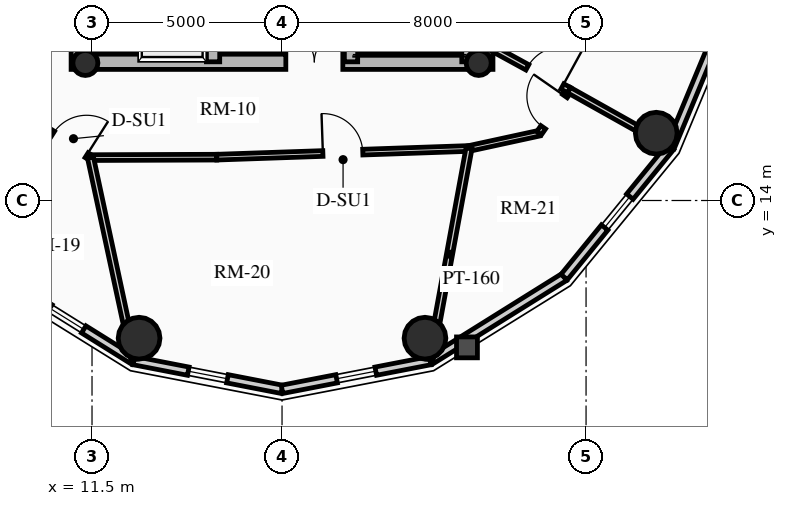
"""IFC4 building model, lengths in metres.
Left out: names, types, materials, properties, quantities, classifications, styles, units other than length and angle.
Written with IfcOpenShell. Run it as: python <this file> out.ifc"""

import sys

from ifc_helpers import new_model, si_unit, direction, frame, frame_2d, origin, origin_2d, place, context, subcontext, project, spatial, rectangle, circle, hollow_circle, extrude, source, transform, mapped, element, fill, save


model = new_model("IFC4")
c1 = context("Model", 3, precision=1e-05, world=origin(), true_north=direction((0.0, 1.0)))
c2 = subcontext(c1, "Body", "Model", "MODEL_VIEW")
j1 = project(units=[si_unit("LENGTHUNIT", "METRE"), si_unit("PLANEANGLEUNIT", "RADIAN")], contexts=[c1])
p1 = place(None, origin())
s1 = spatial("IfcSite", under=j1, at=p1, CompositionType="ELEMENT")
p2 = place(p1, origin())
s2 = spatial("IfcBuilding", under=s1, at=p2, CompositionType="ELEMENT")
p3 = place(p2, frame((0.0, 0.0, 211.21)))
s3 = spatial("IfcBuildingStorey", under=s2, at=p3, CompositionType="ELEMENT", Elevation=211.21)
for number, where, z_axis, x_axis in (
    (1, (11.15, 17.45, 0.0), (0.0, 0.0, 1.0), (0.0, 1.0, 0.0)),
    (2, (21.85, 17.45, 0.0), (0.0, 0.0, 1.0), (0.0, 1.0, 0.0)),
):
    element("IfcWall", number, at=place(p3, frame(where, z_axis=z_axis, x_axis=x_axis)), inside=s3, PredefinedType="SHEAR", context=c2, shape_type="SweptSolid", body=[
        extrude(rectangle(XDim=14.1, YDim=0.4, at=frame_2d((7.05, 0.0))), origin(), (0.0, 0.0, 1.0), 2.91),
    ])
p4 = place(p3, frame((11.15, 17.65, 0.0), z_axis=(0.0, 0.0, 1.0), x_axis=(1.0, 0.0, 0.0)))
e3 = element("IfcWall", 3, at=p4, inside=s3, PredefinedType="SHEAR", context=c2, shape_type="SweptSolid", body=[
    extrude(rectangle(XDim=10.7, YDim=0.4, at=frame_2d((5.35, 0.0))), origin(), (0.0, 0.0, 1.0), 2.91),
])
m1 = source(origin(), c2, "Body", "SweptSolid", [
    extrude(rectangle(XDim=1.5, YDim=2.02, at=frame_2d((0.75, 1.01))), frame((0.0, 0.21, 0.0), z_axis=(0.0, -1.0, 0.0), x_axis=(1.0, 0.0, 0.0)), (0.0, 0.0, 1.0), 0.42),
])
p5 = place(p4, frame((5.45, 0.0, 0.0)))
e4 = element("IfcOpeningElement", 4, at=p5, cuts=e3, PredefinedType="OPENING", context=c2, shape_type="MappedRepresentation", body=[
    mapped(m1, transform((0.0, 0.0, 0.0), x_axis=(1.0, 0.0, 0.0), y_axis=(0.0, 1.0, 0.0), z_axis=(0.0, 0.0, 1.0), scale=1.0)),
])
p6 = place(p3, frame((14.685, 17.65, 0.0), z_axis=(0.0, 0.0, 1.0), x_axis=(0.0, 1.0, 0.0)))
e5 = element("IfcWall", 5, at=p6, inside=s3, PredefinedType="SHEAR", context=c2, shape_type="SweptSolid", body=[
    extrude(rectangle(XDim=13.7, YDim=0.35, at=frame_2d((6.85, 0.0))), origin(), (0.0, 0.0, 1.0), 2.91),
])
m2 = source(origin(), c2, "Body", "SweptSolid", [
    extrude(rectangle(XDim=1.1, YDim=2.015, at=frame_2d((0.55, 1.007))), frame((0.0, 0.185, 0.0), z_axis=(0.0, -1.0, 0.0), x_axis=(1.0, 0.0, 0.0)), (0.0, 0.0, 1.0), 0.37),
])
p7 = place(p6, frame((4.85, 0.0, 0.0)))
e6 = element("IfcOpeningElement", 6, at=p7, cuts=e5, PredefinedType="OPENING", context=c2, shape_type="MappedRepresentation", body=[
    mapped(m2, transform((0.0, 0.0, 0.0), x_axis=(1.0, 0.0, 0.0), y_axis=(0.0, 1.0, 0.0), z_axis=(0.0, 0.0, 1.0), scale=1.0)),
])
p8 = place(p6, frame((0.625, 0.0, 0.0)))
e7 = element("IfcOpeningElement", 7, at=p8, cuts=e5, PredefinedType="OPENING", context=c2, shape_type="MappedRepresentation", body=[
    mapped(m2, transform((0.0, 0.0, 0.0), x_axis=(1.0, 0.0, 0.0), y_axis=(0.0, 1.0, 0.0), z_axis=(0.0, 0.0, 1.0), scale=1.0)),
])
p9 = place(p6, frame((2.625, 0.0, 0.0)))
e8 = element("IfcOpeningElement", 8, at=p9, cuts=e5, PredefinedType="OPENING", context=c2, shape_type="MappedRepresentation", body=[
    mapped(m2, transform((0.0, 0.0, 0.0), x_axis=(1.0, 0.0, 0.0), y_axis=(0.0, 1.0, 0.0), z_axis=(0.0, 0.0, 1.0), scale=1.0)),
])
m3 = source(origin(), c2, "Body", "SweptSolid", [
    extrude(rectangle(XDim=1.15, YDim=2.02, at=frame_2d((0.575, 1.01))), frame((0.0, 0.185, 0.0), z_axis=(0.0, -1.0, 0.0), x_axis=(1.0, 0.0, 0.0)), (0.0, 0.0, 1.0), 0.37),
])
p10 = place(p6, frame((7.27, 0.0, 0.0)))
e9 = element("IfcOpeningElement", 9, at=p10, cuts=e5, PredefinedType="OPENING", context=c2, shape_type="MappedRepresentation", body=[
    mapped(m3, transform((0.0, 0.0, 0.0), x_axis=(1.0, 0.0, 0.0), y_axis=(0.0, 1.0, 0.0), z_axis=(0.0, 0.0, 1.0), scale=1.0)),
])
p11 = place(p3, frame((18.315, 17.65, 0.0), z_axis=(0.0, 0.0, 1.0), x_axis=(0.0, 1.0, 0.0)))
e10 = element("IfcWall", 10, at=p11, inside=s3, PredefinedType="SHEAR", context=c2, shape_type="SweptSolid", body=[
    extrude(rectangle(XDim=9.6, YDim=0.35, at=frame_2d((4.8, 0.0))), origin(), (0.0, 0.0, 1.0), 2.91),
])
p12 = place(p11, frame((5.28, 0.0, 0.0)))
e11 = element("IfcOpeningElement", 11, at=p12, cuts=e10, PredefinedType="OPENING", context=c2, shape_type="MappedRepresentation", body=[
    mapped(m3, transform((0.0, 0.0, 0.0), x_axis=(1.0, 0.0, 0.0), y_axis=(0.0, 1.0, 0.0), z_axis=(0.0, 0.0, 1.0), scale=1.0)),
])
p13 = place(p3, frame((21.405, 17.65, 0.0), z_axis=(0.0, 0.0, 1.0), x_axis=(0.0, 1.0, 0.0)))
e12 = element("IfcWall", 12, at=p13, inside=s3, PredefinedType="SHEAR", context=c2, shape_type="SweptSolid", body=[
    extrude(rectangle(XDim=6.695, YDim=0.35, at=frame_2d((3.348, 0.0))), origin(), (0.0, 0.0, 1.0), 2.91),
])
for number, where, z_axis, x_axis in (
    (13, (11.325, 17.62, 0.0), (0.0, 0.0, 1.0), (1.0, 0.0, 0.0)),
    (14, (21.675, 17.62, 0.0), (0.0, 0.0, 1.0), (1.0, 0.0, 0.0)),
):
    element("IfcColumn", number, at=place(p3, frame(where, z_axis=z_axis, x_axis=x_axis)), inside=s3, PredefinedType="COLUMN", context=c2, shape_type="SweptSolid", body=[
        extrude(hollow_circle(Radius=0.33, WallThickness=0.025, at=origin_2d()), origin(), (0.0, 0.0, 1.0), 2.91),
    ])
for number, where, z_axis, x_axis in (
    (15, (12.739, 10.377, 0.0), (0.0, 0.0, 1.0), (1.0, 0.0, 0.0)),
    (16, (20.261, 10.377, 0.0), (0.0, 0.0, 1.0), (1.0, 0.0, 0.0)),
    (17, (26.347, 15.771, 0.0), (0.0, 0.0, 1.0), (1.0, 0.0, 0.0)),
):
    element("IfcColumn", number, at=place(p3, frame(where, z_axis=z_axis, x_axis=x_axis)), inside=s3, PredefinedType="USERDEFINED", context=c2, shape_type="SweptSolid", body=[
        extrude(circle(Radius=0.55, at=origin_2d()), origin(), (0.0, 0.0, 1.0), 2.91),
    ])
p14 = place(p3, frame((12.597, 9.787, 0.0), z_axis=(0.0, 0.0, 1.0), x_axis=(-0.848318713376, 0.529485939886, 0.0)))
e18 = element("IfcWall", 18, at=p14, inside=s3, PredefinedType="SOLIDWALL", context=c2, shape_type="SweptSolid", body=[
    extrude(rectangle(XDim=4.15, YDim=0.22, at=frame_2d((2.075, 0.0))), origin(), (0.0, 0.0, 1.0), 2.322),
])
m4 = source(origin(), c2, "Body", "SweptSolid", [
    extrude(rectangle(XDim=1.05, YDim=1.3, at=frame_2d((0.525, 0.65))), frame((0.0, 0.12, 0.0), z_axis=(0.0, -1.0, 0.0), x_axis=(1.0, 0.0, 0.0)), (0.0, 0.0, 1.0), 0.24),
])
p15 = place(p14, frame((1.55, 0.0, 0.65)))
e19 = element("IfcOpeningElement", 19, at=p15, cuts=e18, PredefinedType="OPENING", context=c2, shape_type="MappedRepresentation", body=[
    mapped(m4, transform((0.0, 0.0, 0.0), x_axis=(1.0, 0.0, 0.0), y_axis=(0.0, 1.0, 0.0), z_axis=(0.0, 0.0, 1.0), scale=1.0)),
])
p16 = place(p3, frame((16.5, 9.03, 0.0), z_axis=(0.0, 0.0, 1.0), x_axis=(-0.981700307484, 0.190432419211, 0.0)))
e20 = element("IfcWall", 20, at=p16, inside=s3, PredefinedType="SOLIDWALL", context=c2, shape_type="SweptSolid", body=[
    extrude(rectangle(XDim=3.976, YDim=0.22, at=frame_2d((1.988, 0.0))), origin(), (0.0, 0.0, 1.0), 2.322),
])
p17 = place(p16, frame((1.463, 0.0, 0.65)))
e21 = element("IfcOpeningElement", 21, at=p17, cuts=e20, PredefinedType="OPENING", context=c2, shape_type="MappedRepresentation", body=[
    mapped(m4, transform((0.0, 0.0, 0.0), x_axis=(1.0, 0.0, 0.0), y_axis=(0.0, 1.0, 0.0), z_axis=(0.0, 0.0, 1.0), scale=1.0)),
])
p18 = place(p3, frame((20.403, 9.787, 0.0), z_axis=(0.0, 0.0, 1.0), x_axis=(-0.981700307484, -0.190432419211, 0.0)))
e22 = element("IfcWall", 22, at=p18, inside=s3, PredefinedType="SOLIDWALL", context=c2, shape_type="SweptSolid", body=[
    extrude(rectangle(XDim=3.976, YDim=0.22, at=frame_2d((1.988, 0.0))), origin(), (0.0, 0.0, 1.0), 2.322),
])
p19 = place(p18, frame((1.463, 0.0, 0.65)))
e23 = element("IfcOpeningElement", 23, at=p19, cuts=e22, PredefinedType="OPENING", context=c2, shape_type="MappedRepresentation", body=[
    mapped(m4, transform((0.0, 0.0, 0.0), x_axis=(1.0, 0.0, 0.0), y_axis=(0.0, 1.0, 0.0), z_axis=(0.0, 0.0, 1.0), scale=1.0)),
])
p20 = place(p3, frame((23.924, 11.985, 0.0), z_axis=(0.0, 0.0, 1.0), x_axis=(-0.848318713376, -0.529485939886, 0.0)))
e24 = element("IfcWall", 24, at=p20, inside=s3, PredefinedType="SOLIDWALL", context=c2, shape_type="SweptSolid", body=[
    extrude(rectangle(XDim=4.15, YDim=0.22, at=frame_2d((2.075, 0.0))), origin(), (0.0, 0.0, 1.0), 2.322),
])
p21 = place(p3, frame((26.718, 15.407, 0.0), z_axis=(0.0, 0.0, 1.0), x_axis=(-0.632467166636, -0.774587169483, 0.0)))
e25 = element("IfcWall", 25, at=p21, inside=s3, PredefinedType="SOLIDWALL", context=c2, shape_type="SweptSolid", body=[
    extrude(rectangle(XDim=4.418, YDim=0.22, at=frame_2d((2.209, 0.0))), origin(), (0.0, 0.0, 1.0), 2.322),
])
p22 = place(p21, frame((1.684, 0.0, 0.65)))
e26 = element("IfcOpeningElement", 26, at=p22, cuts=e25, PredefinedType="OPENING", context=c2, shape_type="MappedRepresentation", body=[
    mapped(m4, transform((0.0, 0.0, 0.0), x_axis=(1.0, 0.0, 0.0), y_axis=(0.0, 1.0, 0.0), z_axis=(0.0, 0.0, 1.0), scale=1.0)),
])
p23 = place(p3, frame((28.512, 19.719, 0.0), z_axis=(0.0, 0.0, 1.0), x_axis=(-0.384036305194, -0.923317993052, 0.0)))
e27 = element("IfcWall", 27, at=p23, inside=s3, PredefinedType="SOLIDWALL", context=c2, shape_type="SweptSolid", body=[
    extrude(rectangle(XDim=4.671, YDim=0.22, at=frame_2d((2.335, 0.0))), origin(), (0.0, 0.0, 1.0), 2.322),
])
p24 = place(p3, frame((10.115, 15.983, 0.0), z_axis=(0.0, 0.0, 1.0), x_axis=(0.843995849351, -0.536349705209, 0.0)))
e28 = element("IfcWall", 28, at=p24, inside=s3, PredefinedType="PARTITIONING", context=c2, shape_type="SweptSolid", body=[
    extrude(rectangle(XDim=1.593, YDim=0.15, at=frame_2d((0.796, 0.0))), origin(), (0.0, 0.0, 1.0), 2.255),
])
m5 = source(origin(), c2, "Body", "SweptSolid", [
    extrude(rectangle(XDim=1.05, YDim=2.015, at=frame_2d((0.525, 1.007))), frame((0.0, 0.085, 0.0), z_axis=(0.0, -1.0, 0.0), x_axis=(1.0, 0.0, 0.0)), (0.0, 0.0, 1.0), 0.17),
])
p25 = place(p24, frame((0.423, 0.0, 0.0)))
e29 = element("IfcOpeningElement", 29, at=p25, cuts=e28, PredefinedType="OPENING", context=c2, shape_type="MappedRepresentation", body=[
    mapped(m5, transform((0.0, 0.0, 0.0), x_axis=(1.0, 0.0, 0.0), y_axis=(0.0, 1.0, 0.0), z_axis=(0.0, 0.0, 1.0), scale=1.0)),
])
p26 = place(p3, frame((11.46, 15.129, 0.0), z_axis=(0.0, 0.0, 1.0), x_axis=(0.999993513287, 0.003601858435, 0.0)))
e30 = element("IfcWall", 30, at=p26, inside=s3, PredefinedType="PARTITIONING", context=c2, shape_type="SweptSolid", body=[
    extrude(rectangle(XDim=3.321, YDim=0.15, at=frame_2d((1.661, 0.0))), origin(), (0.0, 0.0, 1.0), 2.322),
])
p27 = place(p3, frame((14.781, 15.141, 0.0), z_axis=(0.0, 0.0, 1.0), x_axis=(0.999407918707, 0.034406569513, 0.0)))
e31 = element("IfcWall", 31, at=p27, inside=s3, PredefinedType="PARTITIONING", context=c2, shape_type="SweptSolid", body=[
    extrude(rectangle(XDim=6.642, YDim=0.15, at=frame_2d((3.321, 0.0))), origin(), (0.0, 0.0, 1.0), 2.255),
])
p28 = place(p27, frame((2.796, 0.0, 0.0)))
e32 = element("IfcOpeningElement", 32, at=p28, cuts=e31, PredefinedType="OPENING", context=c2, shape_type="MappedRepresentation", body=[
    mapped(m5, transform((0.0, 0.0, 0.0), x_axis=(1.0, 0.0, 0.0), y_axis=(0.0, 1.0, 0.0), z_axis=(0.0, 0.0, 1.0), scale=1.0)),
])
p29 = place(p3, frame((21.419, 15.369, 0.0), z_axis=(0.0, 0.0, 1.0), x_axis=(0.977192701953, 0.212354475464, 0.0)))
e33 = element("IfcWall", 33, at=p29, inside=s3, PredefinedType="PARTITIONING", context=c2, shape_type="SweptSolid", body=[
    extrude(rectangle(XDim=1.888, YDim=0.15, at=frame_2d((0.944, 0.0))), origin(), (0.0, 0.0, 1.0), 2.255),
])
p30 = place(p3, frame((23.263, 15.77, 0.0), z_axis=(0.0, 0.0, 1.0), x_axis=(0.570743456919, 0.821128434768, 0.0)))
e34 = element("IfcWall", 34, at=p30, inside=s3, PredefinedType="PARTITIONING", context=c2, shape_type="SweptSolid", body=[
    extrude(rectangle(XDim=1.382, YDim=0.15, at=frame_2d((0.691, 0.0))), origin(), (0.0, 0.0, 1.0), 2.322),
])
m6 = source(origin(), c2, "Body", "SweptSolid", [
    extrude(rectangle(XDim=1.0, YDim=2.015, at=frame_2d((0.5, 1.007))), frame((0.0, 0.085, 0.0), z_axis=(0.0, -1.0, 0.0), x_axis=(1.0, 0.0, 0.0)), (0.0, 0.0, 1.0), 0.17),
])
p31 = place(p30, frame((0.191, 0.0, 0.0)))
e35 = element("IfcOpeningElement", 35, at=p31, cuts=e34, PredefinedType="OPENING", context=c2, shape_type="MappedRepresentation", body=[
    mapped(m6, transform((0.0, 0.0, 0.0), x_axis=(1.0, 0.0, 0.0), y_axis=(0.0, 1.0, 0.0), z_axis=(0.0, 0.0, 1.0), scale=1.0)),
])
p32 = place(p3, frame((11.46, 15.129, 0.0), z_axis=(0.0, 0.0, 1.0), x_axis=(0.210058897642, -0.977688733453, 0.0)))
e36 = element("IfcWall", 36, at=p32, inside=s3, PredefinedType="PARTITIONING", context=c2, shape_type="SweptSolid", body=[
    extrude(rectangle(XDim=5.444, YDim=0.16, at=frame_2d((2.722, 0.0))), origin(), (0.0, 0.0, 1.0), 2.322),
])
p33 = place(p3, frame((21.419, 15.369, 0.0), z_axis=(0.0, 0.0, 1.0), x_axis=(-0.180685606423, -0.98354090491, 0.0)))
e37 = element("IfcWall", 37, at=p33, inside=s3, PredefinedType="PARTITIONING", context=c2, shape_type="SweptSolid", body=[
    extrude(rectangle(XDim=5.656, YDim=0.16, at=frame_2d((2.828, 0.0))), origin(), (0.0, 0.0, 1.0), 2.322),
])
p34 = place(p3, frame((24.052, 16.905, 0.0), z_axis=(0.0, 0.0, 1.0), x_axis=(0.872220814965, -0.489112308106, 0.0)))
e38 = element("IfcWall", 38, at=p34, inside=s3, PredefinedType="PARTITIONING", context=c2, shape_type="SweptSolid", body=[
    extrude(rectangle(XDim=3.038, YDim=0.16, at=frame_2d((1.519, 0.0))), origin(), (0.0, 0.0, 1.0), 2.322),
])
p35 = place(p3, frame((22.05, 18.0, 0.0), z_axis=(0.0, 0.0, 1.0), x_axis=(0.877252891813, -0.480028503118, 0.0)))
e39 = element("IfcWall", 39, at=p35, inside=s3, PredefinedType="PARTITIONING", context=c2, shape_type="SweptSolid", body=[
    extrude(rectangle(XDim=2.282, YDim=0.16, at=frame_2d((1.141, 0.0))), origin(), (0.0, 0.0, 1.0), 2.255),
])
m7 = source(origin(), c2, "Body", "SweptSolid", [
    extrude(rectangle(XDim=1.05, YDim=2.015, at=frame_2d((0.525, 1.007))), frame((0.0, 0.09, 0.0), z_axis=(0.0, -1.0, 0.0), x_axis=(1.0, 0.0, 0.0)), (0.0, 0.0, 1.0), 0.18),
])
p36 = place(p35, frame((1.032, 0.0, 0.0)))
e40 = element("IfcOpeningElement", 40, at=p36, cuts=e39, PredefinedType="OPENING", context=c2, shape_type="MappedRepresentation", body=[
    mapped(m7, transform((0.0, 0.0, 0.0), x_axis=(1.0, 0.0, 0.0), y_axis=(0.0, 1.0, 0.0), z_axis=(0.0, 0.0, 1.0), scale=1.0)),
])
m8 = source(origin(), c2, "Body", "SweptSolid", [
    extrude(rectangle(XDim=1.05, YDim=1.3, at=frame_2d((0.525, 0.65))), frame((0.0, 0.03, 0.0), z_axis=(0.0, -1.0, 0.0), x_axis=(1.0, 0.0, 0.0)), (0.0, 0.0, 1.0), 0.06),
])
p37 = place(p15, origin())
e41 = element("IfcWindow", 41, at=p37, inside=s3, PartitioningType="SINGLE_PANEL", PredefinedType="WINDOW", context=c2, shape_type="MappedRepresentation", body=[
    mapped(m8, transform((0.0, 0.0, 0.0), x_axis=(1.0, 0.0, 0.0), y_axis=(0.0, 1.0, 0.0), z_axis=(0.0, 0.0, 1.0), scale=1.0)),
])
fill(e19, e41)
p38 = place(p17, origin())
e42 = element("IfcWindow", 42, at=p38, inside=s3, PartitioningType="SINGLE_PANEL", PredefinedType="WINDOW", context=c2, shape_type="MappedRepresentation", body=[
    mapped(m8, transform((0.0, 0.0, 0.0), x_axis=(1.0, 0.0, 0.0), y_axis=(0.0, 1.0, 0.0), z_axis=(0.0, 0.0, 1.0), scale=1.0)),
])
fill(e21, e42)
p39 = place(p19, origin())
e43 = element("IfcWindow", 43, at=p39, inside=s3, PartitioningType="SINGLE_PANEL", PredefinedType="WINDOW", context=c2, shape_type="MappedRepresentation", body=[
    mapped(m8, transform((0.0, 0.0, 0.0), x_axis=(1.0, 0.0, 0.0), y_axis=(0.0, 1.0, 0.0), z_axis=(0.0, 0.0, 1.0), scale=1.0)),
])
fill(e23, e43)
p40 = place(p22, origin())
e44 = element("IfcWindow", 44, at=p40, inside=s3, PartitioningType="SINGLE_PANEL", PredefinedType="WINDOW", context=c2, shape_type="MappedRepresentation", body=[
    mapped(m8, transform((0.0, 0.0, 0.0), x_axis=(1.0, 0.0, 0.0), y_axis=(0.0, 1.0, 0.0), z_axis=(0.0, 0.0, 1.0), scale=1.0)),
])
fill(e26, e44)
m9 = source(origin(), c2, "Body", "SweptSolid", [
    extrude(rectangle(XDim=1.5, YDim=2.02, at=frame_2d((0.75, 1.01))), frame((0.0, 0.025, 0.0), z_axis=(0.0, -1.0, 0.0), x_axis=(1.0, 0.0, 0.0)), (0.0, 0.0, 1.0), 0.05),
])
p41 = place(p5, origin())
e45 = element("IfcDoor", 45, at=p41, inside=s3, OperationType="DOUBLE_DOOR_SINGLE_SWING", PredefinedType="DOOR", context=c2, shape_type="MappedRepresentation", body=[
    mapped(m9, transform((0.0, 0.0, 0.0), x_axis=(1.0, 0.0, 0.0), y_axis=(0.0, 1.0, 0.0), z_axis=(0.0, 0.0, 1.0), scale=1.0)),
])
fill(e4, e45)
m10 = source(origin(), c2, "Body", "SweptSolid", [
    extrude(rectangle(XDim=1.05, YDim=2.015, at=frame_2d((0.525, 1.007))), frame((0.0, 0.025, 0.0), z_axis=(0.0, -1.0, 0.0), x_axis=(1.0, 0.0, 0.0)), (0.0, 0.0, 1.0), 0.05),
])
p42 = place(p36, origin())
e46 = element("IfcDoor", 46, at=p42, inside=s3, OperationType="SINGLE_SWING_RIGHT", PredefinedType="DOOR", context=c2, shape_type="MappedRepresentation", body=[
    mapped(m10, transform((0.0, 0.0, 0.0), x_axis=(1.0, 0.0, 0.0), y_axis=(0.0, 1.0, 0.0), z_axis=(0.0, 0.0, 1.0), scale=1.0)),
])
fill(e40, e46)
p43 = place(p25, origin())
e47 = element("IfcDoor", 47, at=p43, inside=s3, OperationType="SINGLE_SWING_RIGHT", PredefinedType="DOOR", context=c2, shape_type="MappedRepresentation", body=[
    mapped(m10, transform((0.0, 0.0, 0.0), x_axis=(1.0, 0.0, 0.0), y_axis=(0.0, 1.0, 0.0), z_axis=(0.0, 0.0, 1.0), scale=1.0)),
])
fill(e29, e47)
p44 = place(p28, origin())
e48 = element("IfcDoor", 48, at=p44, inside=s3, OperationType="SINGLE_SWING_LEFT", PredefinedType="DOOR", context=c2, shape_type="MappedRepresentation", body=[
    mapped(m10, transform((0.0, 0.0, 0.0), x_axis=(1.0, 0.0, 0.0), y_axis=(0.0, 1.0, 0.0), z_axis=(0.0, 0.0, 1.0), scale=1.0)),
])
fill(e32, e48)
m11 = source(origin(), c2, "Body", "SweptSolid", [
    extrude(rectangle(XDim=1.0, YDim=2.015, at=frame_2d((0.5, 1.007))), frame((0.0, 0.025, 0.0), z_axis=(0.0, -1.0, 0.0), x_axis=(1.0, 0.0, 0.0)), (0.0, 0.0, 1.0), 0.05),
])
p45 = place(p31, origin())
e49 = element("IfcDoor", 49, at=p45, inside=s3, OperationType="SINGLE_SWING_RIGHT", PredefinedType="DOOR", context=c2, shape_type="MappedRepresentation", body=[
    mapped(m11, transform((0.0, 0.0, 0.0), x_axis=(1.0, 0.0, 0.0), y_axis=(0.0, 1.0, 0.0), z_axis=(0.0, 0.0, 1.0), scale=1.0)),
])
fill(e35, e49)
save(model, sys.argv[1])
